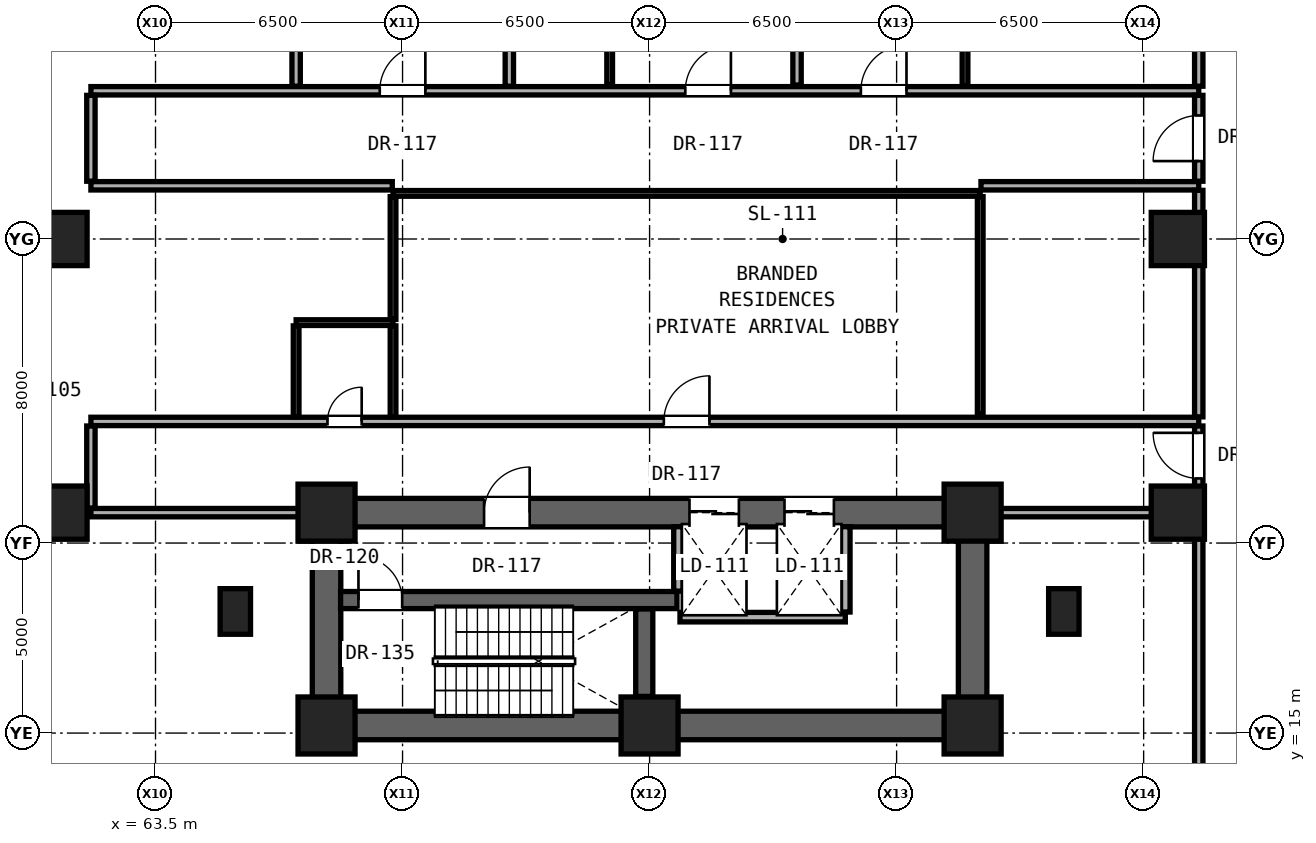
"""IFC4 building model, lengths in metres.
Left out: names, types, materials, properties, quantities, classifications, styles, units other than length and angle.
Written with IfcOpenShell. Run it as: python <this file> out.ifc"""

import sys

from ifc_helpers import new_model, si_unit, direction, frame, frame_2d, origin, origin_2d, place, context, subcontext, project, spatial, rectangle, hollow_rectangle, extrude, element, fill, save


model = new_model("IFC4")
c1 = context("Model", 3, precision=1e-05, world=origin(), true_north=direction((0.0, 1.0)))
c2 = subcontext(c1, "Body", "Model", "MODEL_VIEW")
j1 = project(units=[si_unit("LENGTHUNIT", "METRE"), si_unit("PLANEANGLEUNIT", "RADIAN")], contexts=[c1])
p1 = place(None, origin())
s1 = spatial("IfcSite", under=j1, at=p1, CompositionType="ELEMENT")
p2 = place(p1, origin())
s2 = spatial("IfcBuilding", under=s1, at=p2, CompositionType="ELEMENT")
p3 = place(p2, origin())
s3 = spatial("IfcBuildingStorey", under=s2, at=p3, CompositionType="ELEMENT", Elevation=0.0)
for number, where, z_axis, x_axis in (
    (1, (68.0, 15.2, 0.0), (0.0, 0.0, 1.0), (1.0, 0.0, 0.0)),
    (2, (76.5, 15.2, 0.0), (0.0, 0.0, 1.0), (1.0, 0.0, 0.0)),
    (3, (85.0, 15.2, 0.0), (0.0, 0.0, 1.0), (1.0, 0.0, 0.0)),
    (4, (68.0, 20.8, 0.0), (0.0, 0.0, 1.0), (1.0, 0.0, 0.0)),
    (5, (85.0, 20.8, 0.0), (0.0, 0.0, 1.0), (1.0, 0.0, 0.0)),
):
    element("IfcColumn", number, at=place(p3, frame(where, z_axis=z_axis, x_axis=x_axis)), inside=s3, PredefinedType="COLUMN", context=c2, shape_type="SweptSolid", body=[
        extrude(rectangle(XDim=1.5, YDim=1.5, at=origin_2d()), origin(), (0.0, 0.0, 1.0), 5.2),
    ])
for number, where, z_axis, x_axis in (
    (6, (61.0, 20.8, 0.0), (0.0, 0.0, 1.0), (1.0, 0.0, 0.0)),
    (7, (61.0, 28.0, 0.0), (0.0, 0.0, 1.0), (1.0, 0.0, 0.0)),
    (8, (90.4, 20.8, 0.0), (0.0, 0.0, 1.0), (1.0, 0.0, 0.0)),
    (9, (90.4, 28.0, 0.0), (0.0, 0.0, 1.0), (1.0, 0.0, 0.0)),
):
    element("IfcColumn", number, at=place(p3, frame(where, z_axis=z_axis, x_axis=x_axis)), inside=s3, PredefinedType="COLUMN", context=c2, shape_type="SweptSolid", body=[
        extrude(hollow_rectangle(XDim=1.4, YDim=1.4, WallThickness=0.08, at=origin_2d()), origin(), (0.0, 0.0, 1.0), 5.2),
    ])
for number, where, z_axis, x_axis in (
    (10, (65.6, 18.2, 0.0), (0.0, 0.0, 1.0), (1.0, 0.0, 0.0)),
    (11, (87.4, 18.2, 0.0), (0.0, 0.0, 1.0), (1.0, 0.0, 0.0)),
):
    element("IfcColumn", number, at=place(p3, frame(where, z_axis=z_axis, x_axis=x_axis)), inside=s3, PredefinedType="PILASTER", context=c2, shape_type="SweptSolid", body=[
        extrude(rectangle(XDim=0.8, YDim=1.2, at=origin_2d()), origin(), (0.0, 0.0, 1.0), 5.2),
    ])
p4 = place(p3, frame((68.0, 15.2, 0.0), z_axis=(0.0, 0.0, 1.0), x_axis=(1.0, 0.0, 0.0)))
e12 = element("IfcWall", 12, at=p4, inside=s3, PredefinedType="SHEAR", context=c2, shape_type="SweptSolid", body=[
    extrude(rectangle(XDim=17.0, YDim=0.75, at=frame_2d((8.5, 0.0))), origin(), (0.0, 0.0, 1.0), 4.88),
])
for number, where, z_axis, x_axis in (
    (13, (68.0, 15.2, 0.0), (0.0, 0.0, 1.0), (0.0, 1.0, 0.0)),
    (14, (85.0, 15.2, 0.0), (0.0, 0.0, 1.0), (0.0, 1.0, 0.0)),
):
    element("IfcWall", number, at=place(p3, frame(where, z_axis=z_axis, x_axis=x_axis)), inside=s3, PredefinedType="SHEAR", context=c2, shape_type="SweptSolid", body=[
        extrude(rectangle(XDim=5.6, YDim=0.75, at=frame_2d((2.8, 0.0))), origin(), (0.0, 0.0, 1.0), 4.88),
    ])
p5 = place(p3, frame((68.0, 20.8, 0.0), z_axis=(0.0, 0.0, 1.0), x_axis=(1.0, 0.0, 0.0)))
e15 = element("IfcWall", 15, at=p5, inside=s3, PredefinedType="SHEAR", context=c2, shape_type="SweptSolid", body=[
    extrude(rectangle(XDim=17.0, YDim=0.75, at=frame_2d((8.5, 0.0))), origin(), (0.0, 0.0, 1.0), 4.88),
])
p6 = place(p5, frame((4.145, 0.0, 0.0)))
e16 = element("IfcOpeningElement", 16, at=p6, cuts=e15, PredefinedType="OPENING", context=c2, shape_type="SweptSolid", body=[
    extrude(rectangle(XDim=1.2, YDim=2.25, at=frame_2d((0.6, 1.125))), frame((0.0, 0.385, 0.0), z_axis=(0.0, -1.0, 0.0), x_axis=(1.0, 0.0, 0.0)), (0.0, 0.0, 1.0), 0.77),
])
p7 = place(p5, frame((9.55, 0.0, 0.0)))
e17 = element("IfcOpeningElement", 17, at=p7, cuts=e15, PredefinedType="OPENING", context=c2, shape_type="SweptSolid", body=[
    extrude(rectangle(XDim=1.3, YDim=2.3, at=frame_2d((0.65, 1.15))), frame((0.0, 0.385, 0.0), z_axis=(0.0, -1.0, 0.0), x_axis=(1.0, 0.0, 0.0)), (0.0, 0.0, 1.0), 0.77),
])
p8 = place(p5, frame((12.05, 0.0, 0.0)))
e18 = element("IfcOpeningElement", 18, at=p8, cuts=e15, PredefinedType="OPENING", context=c2, shape_type="SweptSolid", body=[
    extrude(rectangle(XDim=1.3, YDim=2.3, at=frame_2d((0.65, 1.15))), frame((0.0, 0.385, 0.0), z_axis=(0.0, -1.0, 0.0), x_axis=(1.0, 0.0, 0.0)), (0.0, 0.0, 1.0), 0.77),
])
p9 = place(p3, frame((77.3, 18.05, 0.0), z_axis=(0.0, 0.0, 1.0), x_axis=(1.0, 0.0, 0.0)))
e19 = element("IfcWall", 19, at=p9, inside=s3, PredefinedType="SOLIDWALL", context=c2, shape_type="SweptSolid", body=[
    extrude(rectangle(XDim=4.35, YDim=0.25, at=frame_2d((2.175, 0.0))), origin(), (0.0, 0.0, 1.0), 4.88),
])
p10 = place(p3, frame((68.37, 18.5, 0.0), z_axis=(0.0, 0.0, 1.0), x_axis=(1.0, 0.0, 0.0)))
e20 = element("IfcWall", 20, at=p10, inside=s3, PredefinedType="SHEAR", context=c2, shape_type="SweptSolid", body=[
    extrude(rectangle(XDim=8.85, YDim=0.45, at=frame_2d((4.425, 0.0))), origin(), (0.0, 0.0, 1.0), 4.88),
])
p11 = place(p10, frame((0.47, 0.0, 0.0)))
e21 = element("IfcOpeningElement", 21, at=p11, cuts=e20, PredefinedType="OPENING", context=c2, shape_type="SweptSolid", body=[
    extrude(rectangle(XDim=1.15, YDim=2.2, at=frame_2d((0.575, 1.1))), frame((0.0, 0.235, 0.0), z_axis=(0.0, -1.0, 0.0), x_axis=(1.0, 0.0, 0.0)), (0.0, 0.0, 1.0), 0.47),
])
p12 = place(p3, frame((61.8, 20.8, 0.0), z_axis=(0.0, 0.0, 1.0), x_axis=(1.0, 0.0, 0.0)))
e22 = element("IfcWall", 22, at=p12, inside=s3, PredefinedType="SOLIDWALL", context=c2, shape_type="SweptSolid", body=[
    extrude(rectangle(XDim=5.83, YDim=0.22, at=frame_2d((2.915, 0.0))), origin(), (0.0, 0.0, 1.0), 3.772),
])
p13 = place(p3, frame((85.37, 20.8, 0.0), z_axis=(0.0, 0.0, 1.0), x_axis=(1.0, 0.0, 0.0)))
e23 = element("IfcWall", 23, at=p13, inside=s3, PredefinedType="SOLIDWALL", context=c2, shape_type="SweptSolid", body=[
    extrude(rectangle(XDim=5.58, YDim=0.22, at=frame_2d((2.79, 0.0))), origin(), (0.0, 0.0, 1.0), 3.772),
])
p14 = place(p3, frame((61.8, 23.2, 0.0), z_axis=(0.0, 0.0, 1.0), x_axis=(1.0, 0.0, 0.0)))
e24 = element("IfcWall", 24, at=p14, inside=s3, PredefinedType="SOLIDWALL", context=c2, shape_type="SweptSolid", body=[
    extrude(rectangle(XDim=29.15, YDim=0.22, at=frame_2d((14.575, 0.0))), origin(), (0.0, 0.0, 1.0), 3.945),
])
p15 = place(p14, frame((6.225, 0.0, 0.0)))
e25 = element("IfcOpeningElement", 25, at=p15, cuts=e24, PredefinedType="OPENING", context=c2, shape_type="SweptSolid", body=[
    extrude(rectangle(XDim=0.9, YDim=2.1, at=frame_2d((0.45, 1.05))), frame((0.0, 0.12, 0.0), z_axis=(0.0, -1.0, 0.0), x_axis=(1.0, 0.0, 0.0)), (0.0, 0.0, 1.0), 0.24),
])
p16 = place(p14, frame((15.075, 0.0, 0.0)))
e26 = element("IfcOpeningElement", 26, at=p16, cuts=e24, PredefinedType="OPENING", context=c2, shape_type="SweptSolid", body=[
    extrude(rectangle(XDim=1.2, YDim=2.25, at=frame_2d((0.6, 1.125))), frame((0.0, 0.12, 0.0), z_axis=(0.0, -1.0, 0.0), x_axis=(1.0, 0.0, 0.0)), (0.0, 0.0, 1.0), 0.24),
])
p17 = place(p3, frame((67.2, 25.8, 0.0), z_axis=(0.0, 0.0, 1.0), x_axis=(1.0, 0.0, 0.0)))
e27 = element("IfcWall", 27, at=p17, inside=s3, PredefinedType="PARTITIONING", context=c2, shape_type="SweptSolid", body=[
    extrude(rectangle(XDim=2.55, YDim=0.15, at=frame_2d((1.275, 0.0))), origin(), (0.0, 0.0, 1.0), 3.945),
])
p18 = place(p3, frame((69.75, 29.2, 0.0), z_axis=(0.0, 0.0, 1.0), x_axis=(1.0, 0.0, 0.0)))
e28 = element("IfcWall", 28, at=p18, inside=s3, PredefinedType="PARTITIONING", context=c2, shape_type="SweptSolid", body=[
    extrude(rectangle(XDim=15.45, YDim=0.15, at=frame_2d((7.725, 0.0))), origin(), (0.0, 0.0, 1.0), 3.945),
])
p19 = place(p3, frame((61.8, 29.4, 0.0), z_axis=(0.0, 0.0, 1.0), x_axis=(1.0, 0.0, 0.0)))
e29 = element("IfcWall", 29, at=p19, inside=s3, PredefinedType="SOLIDWALL", context=c2, shape_type="SweptSolid", body=[
    extrude(rectangle(XDim=7.93, YDim=0.22, at=frame_2d((3.965, 0.0))), origin(), (0.0, 0.0, 1.0), 3.945),
])
p20 = place(p3, frame((85.22, 29.4, 0.0), z_axis=(0.0, 0.0, 1.0), x_axis=(1.0, 0.0, 0.0)))
e30 = element("IfcWall", 30, at=p20, inside=s3, PredefinedType="SOLIDWALL", context=c2, shape_type="SweptSolid", body=[
    extrude(rectangle(XDim=5.73, YDim=0.22, at=frame_2d((2.865, 0.0))), origin(), (0.0, 0.0, 1.0), 4.016),
])
p21 = place(p3, frame((61.8, 31.9, 0.0), z_axis=(0.0, 0.0, 1.0), x_axis=(1.0, 0.0, 0.0)))
e31 = element("IfcWall", 31, at=p21, inside=s3, PredefinedType="SOLIDWALL", context=c2, shape_type="SweptSolid", body=[
    extrude(rectangle(XDim=29.15, YDim=0.22, at=frame_2d((14.575, 0.0))), origin(), (0.0, 0.0, 1.0), 3.945),
])
p22 = place(p21, frame((7.6, 0.0, 0.0)))
e32 = element("IfcOpeningElement", 32, at=p22, cuts=e31, PredefinedType="OPENING", context=c2, shape_type="SweptSolid", body=[
    extrude(rectangle(XDim=1.2, YDim=2.25, at=frame_2d((0.6, 1.125))), frame((0.0, 0.12, 0.0), z_axis=(0.0, -1.0, 0.0), x_axis=(1.0, 0.0, 0.0)), (0.0, 0.0, 1.0), 0.24),
])
p23 = place(p21, frame((20.26, 0.0, 0.0)))
e33 = element("IfcOpeningElement", 33, at=p23, cuts=e31, PredefinedType="OPENING", context=c2, shape_type="SweptSolid", body=[
    extrude(rectangle(XDim=1.2, YDim=2.25, at=frame_2d((0.6, 1.125))), frame((0.0, 0.12, 0.0), z_axis=(0.0, -1.0, 0.0), x_axis=(1.0, 0.0, 0.0)), (0.0, 0.0, 1.0), 0.24),
])
p24 = place(p21, frame((15.64, 0.0, 0.0)))
e34 = element("IfcOpeningElement", 34, at=p24, cuts=e31, PredefinedType="OPENING", context=c2, shape_type="SweptSolid", body=[
    extrude(rectangle(XDim=1.2, YDim=2.25, at=frame_2d((0.6, 1.125))), frame((0.0, 0.12, 0.0), z_axis=(0.0, -1.0, 0.0), x_axis=(1.0, 0.0, 0.0)), (0.0, 0.0, 1.0), 0.24),
])
p25 = place(p3, frame((61.8, 20.92, 0.0), z_axis=(0.0, 0.0, 1.0), x_axis=(0.0, 1.0, 0.0)))
e35 = element("IfcWall", 35, at=p25, inside=s3, PredefinedType="SOLIDWALL", context=c2, shape_type="SweptSolid", body=[
    extrude(rectangle(XDim=2.16, YDim=0.22, at=frame_2d((1.08, 0.0))), origin(), (0.0, 0.0, 1.0), 3.772),
])
p26 = place(p3, frame((61.8, 29.52, 0.0), z_axis=(0.0, 0.0, 1.0), x_axis=(0.0, 1.0, 0.0)))
e36 = element("IfcWall", 36, at=p26, inside=s3, PredefinedType="SOLIDWALL", context=c2, shape_type="SweptSolid", body=[
    extrude(rectangle(XDim=2.26, YDim=0.22, at=frame_2d((1.13, 0.0))), origin(), (0.0, 0.0, 1.0), 4.88),
])
p27 = place(p3, frame((67.2, 23.32, 0.0), z_axis=(0.0, 0.0, 1.0), x_axis=(0.0, 1.0, 0.0)))
e37 = element("IfcWall", 37, at=p27, inside=s3, PredefinedType="PARTITIONING", context=c2, shape_type="SweptSolid", body=[
    extrude(rectangle(XDim=2.395, YDim=0.15, at=frame_2d((1.198, 0.0))), origin(), (0.0, 0.0, 1.0), 4.88),
])
p28 = place(p3, frame((67.2, 32.02, 0.0), z_axis=(0.0, 0.0, 1.0), x_axis=(0.0, 1.0, 0.0)))
e38 = element("IfcWall", 38, at=p28, inside=s3, PredefinedType="SOLIDWALL", context=c2, shape_type="SweptSolid", body=[
    extrude(rectangle(XDim=3.18, YDim=0.22, at=frame_2d((1.59, 0.0))), origin(), (0.0, 0.0, 1.0), 3.772),
])
p29 = place(p3, frame((69.75, 23.32, 0.0), z_axis=(0.0, 0.0, 1.0), x_axis=(0.0, 1.0, 0.0)))
e39 = element("IfcWall", 39, at=p29, inside=s3, PredefinedType="PARTITIONING", context=c2, shape_type="SweptSolid", body=[
    extrude(rectangle(XDim=2.395, YDim=0.15, at=frame_2d((1.198, 0.0))), origin(), (0.0, 0.0, 1.0), 4.88),
])
p30 = place(p3, frame((69.75, 25.885, 0.0), z_axis=(0.0, 0.0, 1.0), x_axis=(0.0, 1.0, 0.0)))
e40 = element("IfcWall", 40, at=p30, inside=s3, PredefinedType="PARTITIONING", context=c2, shape_type="SweptSolid", body=[
    extrude(rectangle(XDim=3.23, YDim=0.15, at=frame_2d((1.615, 0.0))), origin(), (0.0, 0.0, 1.0), 3.945),
])
p31 = place(p3, frame((72.81, 32.02, 0.0), z_axis=(0.0, 0.0, 1.0), x_axis=(0.0, 1.0, 0.0)))
e41 = element("IfcWall", 41, at=p31, inside=s3, PredefinedType="SOLIDWALL", context=c2, shape_type="SweptSolid", body=[
    extrude(rectangle(XDim=2.81, YDim=0.22, at=frame_2d((1.405, 0.0))), origin(), (0.0, 0.0, 1.0), 4.88),
])
p32 = place(p31, frame((0.98, 0.0, 0.0)))
e42 = element("IfcOpeningElement", 42, at=p32, cuts=e41, PredefinedType="OPENING", context=c2, shape_type="SweptSolid", body=[
    extrude(rectangle(XDim=0.85, YDim=2.01, at=frame_2d((0.425, 1.005))), frame((0.0, 0.12, 0.0), z_axis=(0.0, -1.0, 0.0), x_axis=(1.0, 0.0, 0.0)), (0.0, 0.0, 1.0), 0.24),
])
p33 = place(p3, frame((75.45, 32.05, 0.0), z_axis=(0.0, 0.0, 1.0), x_axis=(0.0, 1.0, 0.0)))
e43 = element("IfcWall", 43, at=p33, inside=s3, PredefinedType="PARTITIONING", context=c2, shape_type="SweptSolid", body=[
    extrude(rectangle(XDim=2.78, YDim=0.15, at=frame_2d((1.39, 0.0))), origin(), (0.0, 0.0, 1.0), 4.88),
])
p34 = place(p3, frame((76.36, 15.965, 0.0), z_axis=(0.0, 0.0, 1.0), x_axis=(0.0, 1.0, 0.0)))
e44 = element("IfcWall", 44, at=p34, inside=s3, PredefinedType="SHEAR", context=c2, shape_type="SweptSolid", body=[
    extrude(rectangle(XDim=2.3, YDim=0.45, at=frame_2d((1.15, 0.0))), origin(), (0.0, 0.0, 1.0), 4.88),
])
p35 = place(p3, frame((77.26, 18.735, 0.0), z_axis=(0.0, 0.0, 1.0), x_axis=(0.0, 1.0, 0.0)))
e45 = element("IfcWall", 45, at=p35, inside=s3, PredefinedType="SOLIDWALL", context=c2, shape_type="SweptSolid", body=[
    extrude(rectangle(XDim=1.695, YDim=0.25, at=frame_2d((0.847, 0.0))), origin(), (0.0, 0.0, 1.0), 4.88),
])
p36 = place(p3, frame((80.38, 32.05, 0.0), z_axis=(0.0, 0.0, 1.0), x_axis=(0.0, 1.0, 0.0)))
e46 = element("IfcWall", 46, at=p36, inside=s3, PredefinedType="SOLIDWALL", context=c2, shape_type="SweptSolid", body=[
    extrude(rectangle(XDim=2.78, YDim=0.22, at=frame_2d((1.39, 0.0))), origin(), (0.0, 0.0, 1.0), 4.88),
])
p37 = place(p3, frame((81.65, 18.185, 0.0), z_axis=(0.0, 0.0, 1.0), x_axis=(0.0, 1.0, 0.0)))
e47 = element("IfcWall", 47, at=p37, inside=s3, PredefinedType="SOLIDWALL", context=c2, shape_type="SweptSolid", body=[
    extrude(rectangle(XDim=2.245, YDim=0.25, at=frame_2d((1.123, 0.0))), origin(), (0.0, 0.0, 1.0), 4.88),
])
p38 = place(p3, frame((84.8, 32.02, 0.0), z_axis=(0.0, 0.0, 1.0), x_axis=(0.0, 1.0, 0.0)))
e48 = element("IfcWall", 48, at=p38, inside=s3, PredefinedType="PARTITIONING", context=c2, shape_type="SweptSolid", body=[
    extrude(rectangle(XDim=2.81, YDim=0.15, at=frame_2d((1.405, 0.0))), origin(), (0.0, 0.0, 1.0), 3.945),
])
p39 = place(p3, frame((85.2, 23.4, 0.0), z_axis=(0.0, 0.0, 1.0), x_axis=(0.0, 1.0, 0.0)))
e49 = element("IfcWall", 49, at=p39, inside=s3, PredefinedType="PARTITIONING", context=c2, shape_type="SweptSolid", body=[
    extrude(rectangle(XDim=5.715, YDim=0.15, at=frame_2d((2.857, 0.0))), origin(), (0.0, 0.0, 1.0), 3.945),
])
p40 = place(p3, frame((90.95, 12.77, 0.0), z_axis=(0.0, 0.0, 1.0), x_axis=(0.0, 1.0, 0.0)))
e50 = element("IfcWall", 50, at=p40, inside=s3, PredefinedType="SOLIDWALL", context=c2, shape_type="SweptSolid", body=[
    extrude(rectangle(XDim=7.91, YDim=0.22, at=frame_2d((3.955, 0.0))), origin(), (0.0, 0.0, 1.0), 4.016),
])
p41 = place(p3, frame((90.95, 20.92, 0.0), z_axis=(0.0, 0.0, 1.0), x_axis=(0.0, 1.0, 0.0)))
e51 = element("IfcWall", 51, at=p41, inside=s3, PredefinedType="SOLIDWALL", context=c2, shape_type="SweptSolid", body=[
    extrude(rectangle(XDim=2.16, YDim=0.22, at=frame_2d((1.08, 0.0))), origin(), (0.0, 0.0, 1.0), 4.88),
])
p42 = place(p41, frame((0.78, 0.0, 0.0)))
e52 = element("IfcOpeningElement", 52, at=p42, cuts=e51, PredefinedType="OPENING", context=c2, shape_type="SweptSolid", body=[
    extrude(rectangle(XDim=1.2, YDim=2.25, at=frame_2d((0.6, 1.125))), frame((0.0, 0.12, 0.0), z_axis=(0.0, -1.0, 0.0), x_axis=(1.0, 0.0, 0.0)), (0.0, 0.0, 1.0), 0.24),
])
p43 = place(p3, frame((90.95, 23.32, 0.0), z_axis=(0.0, 0.0, 1.0), x_axis=(0.0, 1.0, 0.0)))
e53 = element("IfcWall", 53, at=p43, inside=s3, PredefinedType="SOLIDWALL", context=c2, shape_type="SweptSolid", body=[
    extrude(rectangle(XDim=5.96, YDim=0.22, at=frame_2d((2.98, 0.0))), origin(), (0.0, 0.0, 1.0), 4.099),
])
p44 = place(p3, frame((90.95, 29.52, 0.0), z_axis=(0.0, 0.0, 1.0), x_axis=(0.0, 1.0, 0.0)))
e54 = element("IfcWall", 54, at=p44, inside=s3, PredefinedType="SOLIDWALL", context=c2, shape_type="SweptSolid", body=[
    extrude(rectangle(XDim=2.26, YDim=0.22, at=frame_2d((1.13, 0.0))), origin(), (0.0, 0.0, 1.0), 4.88),
])
p45 = place(p44, frame((0.53, 0.0, 0.0)))
e55 = element("IfcOpeningElement", 55, at=p45, cuts=e54, PredefinedType="OPENING", context=c2, shape_type="SweptSolid", body=[
    extrude(rectangle(XDim=1.2, YDim=2.25, at=frame_2d((0.6, 1.125))), frame((0.0, 0.12, 0.0), z_axis=(0.0, -1.0, 0.0), x_axis=(1.0, 0.0, 0.0)), (0.0, 0.0, 1.0), 0.24),
])
p46 = place(p3, frame((90.95, 32.02, 0.0), z_axis=(0.0, 0.0, 1.0), x_axis=(0.0, 1.0, 0.0)))
e56 = element("IfcWall", 56, at=p46, inside=s3, PredefinedType="SOLIDWALL", context=c2, shape_type="SweptSolid", body=[
    extrude(rectangle(XDim=21.83, YDim=0.22, at=frame_2d((10.915, 0.0))), origin(), (0.0, 0.0, 1.0), 4.016),
])
p47 = place(p42, origin())
e57 = element("IfcDoor", 57, at=p47, inside=s3, OperationType="SINGLE_SWING_RIGHT", PredefinedType="DOOR", context=c2, shape_type="SweptSolid", body=[
    extrude(rectangle(XDim=1.2, YDim=2.25, at=frame_2d((0.6, 1.125))), frame((0.0, 0.025, 0.0), z_axis=(0.0, -1.0, 0.0), x_axis=(1.0, 0.0, 0.0)), (0.0, 0.0, 1.0), 0.05),
])
fill(e52, e57)
p48 = place(p45, origin())
e58 = element("IfcDoor", 58, at=p48, inside=s3, OperationType="SINGLE_SWING_LEFT", PredefinedType="DOOR", context=c2, shape_type="SweptSolid", body=[
    extrude(rectangle(XDim=1.2, YDim=2.25, at=frame_2d((0.6, 1.125))), frame((0.0, 0.025, 0.0), z_axis=(0.0, -1.0, 0.0), x_axis=(1.0, 0.0, 0.0)), (0.0, 0.0, 1.0), 0.05),
])
fill(e55, e58)
p49 = place(p22, origin())
e59 = element("IfcDoor", 59, at=p49, inside=s3, OperationType="SINGLE_SWING_RIGHT", PredefinedType="DOOR", context=c2, shape_type="SweptSolid", body=[
    extrude(rectangle(XDim=1.2, YDim=2.25, at=frame_2d((0.6, 1.125))), frame((0.0, 0.025, 0.0), z_axis=(0.0, -1.0, 0.0), x_axis=(1.0, 0.0, 0.0)), (0.0, 0.0, 1.0), 0.05),
])
fill(e32, e59)
p50 = place(p23, origin())
e60 = element("IfcDoor", 60, at=p50, inside=s3, OperationType="SINGLE_SWING_RIGHT", PredefinedType="DOOR", context=c2, shape_type="SweptSolid", body=[
    extrude(rectangle(XDim=1.2, YDim=2.25, at=frame_2d((0.6, 1.125))), frame((0.0, 0.025, 0.0), z_axis=(0.0, -1.0, 0.0), x_axis=(1.0, 0.0, 0.0)), (0.0, 0.0, 1.0), 0.05),
])
fill(e33, e60)
p51 = place(p24, origin())
e61 = element("IfcDoor", 61, at=p51, inside=s3, OperationType="SINGLE_SWING_RIGHT", PredefinedType="DOOR", context=c2, shape_type="SweptSolid", body=[
    extrude(rectangle(XDim=1.2, YDim=2.25, at=frame_2d((0.6, 1.125))), frame((0.0, 0.025, 0.0), z_axis=(0.0, -1.0, 0.0), x_axis=(1.0, 0.0, 0.0)), (0.0, 0.0, 1.0), 0.05),
])
fill(e34, e61)
p52 = place(p6, origin())
e62 = element("IfcDoor", 62, at=p52, inside=s3, OperationType="SINGLE_SWING_RIGHT", PredefinedType="DOOR", context=c2, shape_type="SweptSolid", body=[
    extrude(rectangle(XDim=1.2, YDim=2.25, at=frame_2d((0.6, 1.125))), frame((0.0, 0.025, 0.0), z_axis=(0.0, -1.0, 0.0), x_axis=(1.0, 0.0, 0.0)), (0.0, 0.0, 1.0), 0.05),
])
fill(e16, e62)
p53 = place(p11, origin())
e63 = element("IfcDoor", 63, at=p53, inside=s3, OperationType="SINGLE_SWING_LEFT", PredefinedType="DOOR", context=c2, shape_type="SweptSolid", body=[
    extrude(rectangle(XDim=1.15, YDim=2.2, at=frame_2d((0.575, 1.1))), frame((0.0, 0.025, 0.0), z_axis=(0.0, -1.0, 0.0), x_axis=(1.0, 0.0, 0.0)), (0.0, 0.0, 1.0), 0.05),
])
fill(e21, e63)
p54 = place(p15, origin())
e64 = element("IfcDoor", 64, at=p54, inside=s3, OperationType="SINGLE_SWING_RIGHT", PredefinedType="DOOR", context=c2, shape_type="SweptSolid", body=[
    extrude(rectangle(XDim=0.9, YDim=2.1, at=frame_2d((0.45, 1.05))), frame((0.0, 0.025, 0.0), z_axis=(0.0, -1.0, 0.0), x_axis=(1.0, 0.0, 0.0)), (0.0, 0.0, 1.0), 0.05),
])
fill(e25, e64)
p55 = place(p16, origin())
e65 = element("IfcDoor", 65, at=p55, inside=s3, OperationType="SINGLE_SWING_RIGHT", PredefinedType="DOOR", context=c2, shape_type="SweptSolid", body=[
    extrude(rectangle(XDim=1.2, YDim=2.25, at=frame_2d((0.6, 1.125))), frame((0.0, 0.025, 0.0), z_axis=(0.0, -1.0, 0.0), x_axis=(1.0, 0.0, 0.0)), (0.0, 0.0, 1.0), 0.05),
])
fill(e26, e65)
p56 = place(p7, origin())
e66 = element("IfcDoor", 66, at=p56, inside=s3, OperationType="DOUBLE_DOOR_SLIDING", PredefinedType="DOOR", context=c2, shape_type="SweptSolid", body=[
    extrude(rectangle(XDim=1.3, YDim=2.3, at=frame_2d((0.65, 1.15))), frame((0.0, 0.025, 0.0), z_axis=(0.0, -1.0, 0.0), x_axis=(1.0, 0.0, 0.0)), (0.0, 0.0, 1.0), 0.05),
])
fill(e17, e66)
p57 = place(p8, origin())
e67 = element("IfcDoor", 67, at=p57, inside=s3, OperationType="DOUBLE_DOOR_SLIDING", PredefinedType="DOOR", context=c2, shape_type="SweptSolid", body=[
    extrude(rectangle(XDim=1.3, YDim=2.3, at=frame_2d((0.65, 1.15))), frame((0.0, 0.025, 0.0), z_axis=(0.0, -1.0, 0.0), x_axis=(1.0, 0.0, 0.0)), (0.0, 0.0, 1.0), 0.05),
])
fill(e18, e67)
save(model, sys.argv[1])
